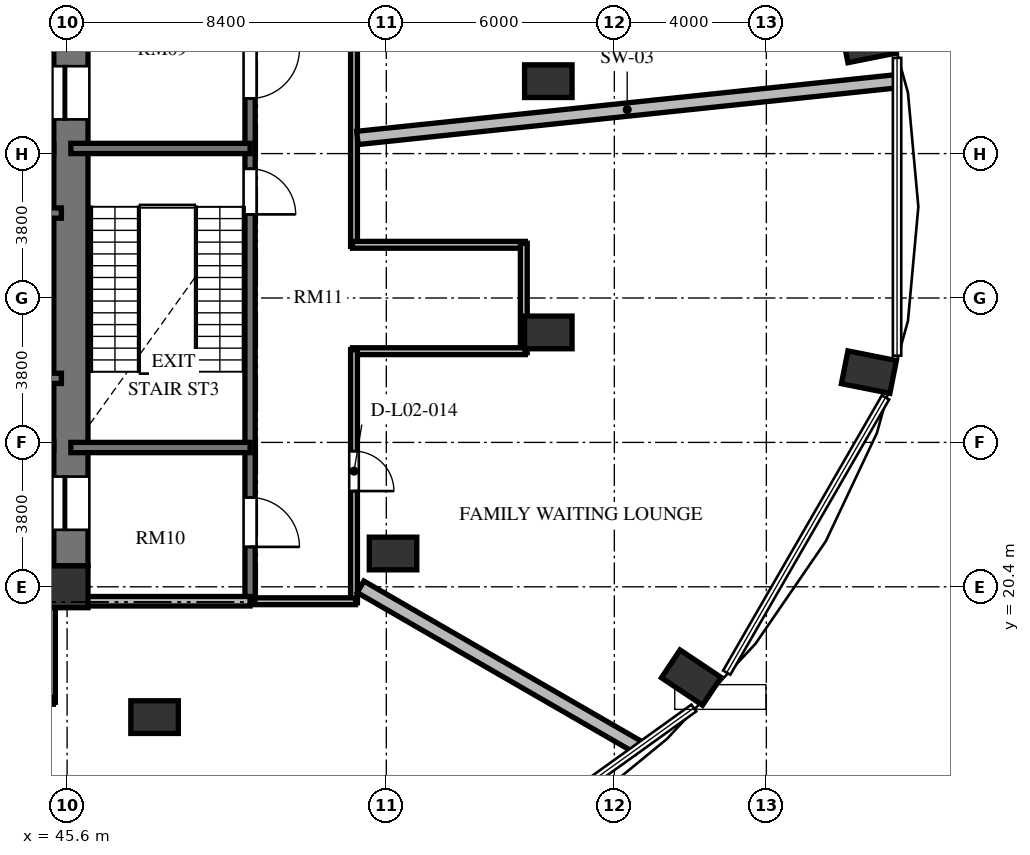
"""IFC4 building model, lengths in metres.
Left out: names, types, materials, properties, quantities, classifications, styles, units other than length and angle.
Written with IfcOpenShell. Run it as: python <this file> out.ifc"""

import sys

from ifc_helpers import new_model, si_unit, direction, frame, frame_2d, origin, origin_2d, place, context, subcontext, project, spatial, rectangle, extrude, element, fill, save


model = new_model("IFC4")
c1 = context("Model", 3, precision=1e-05, world=origin(), true_north=direction((0.0, 1.0)))
c2 = subcontext(c1, "Body", "Model", "MODEL_VIEW")
j1 = project(units=[si_unit("LENGTHUNIT", "METRE"), si_unit("PLANEANGLEUNIT", "RADIAN")], contexts=[c1])
p1 = place(None, origin())
s1 = spatial("IfcSite", under=j1, at=p1, CompositionType="ELEMENT")
p2 = place(p1, origin())
s2 = spatial("IfcBuilding", under=s1, at=p2, CompositionType="ELEMENT")
p3 = place(p2, frame((0.0, 0.0, 10.8)))
s3 = spatial("IfcBuildingStorey", under=s2, at=p3, CompositionType="ELEMENT", Elevation=10.8)
for number, where, z_axis, x_axis in (
    (1, (62.025, 18.011, 0.0), (0.0, 0.0, 1.0), (0.831, -0.556, 0.0)),
    (2, (66.698, 26.05, 0.0), (0.0, 0.0, 1.0), (0.981, -0.195, 0.0)),
    (3, (66.698, 34.75, 0.0), (0.0, 0.0, 1.0), (0.981, 0.195, 0.0)),
):
    element("IfcColumn", number, at=place(p3, frame(where, z_axis=z_axis, x_axis=x_axis)), inside=s3, PredefinedType="COLUMN", context=c2, shape_type="SweptSolid", body=[
        extrude(rectangle(XDim=1.3, YDim=0.88, at=origin_2d()), origin(), (0.0, 0.0, 1.0), 4.8),
    ])
p4 = place(p3, frame((45.6, 20.4, 0.0), z_axis=(0.0, 0.0, 1.0), x_axis=(1.0, 0.0, 0.0)))
e4 = element("IfcColumn", 4, at=p4, inside=s3, PredefinedType="COLUMN", context=c2, shape_type="SweptSolid", body=[
    extrude(rectangle(XDim=1.1, YDim=1.1, at=origin_2d()), origin(), (0.0, 0.0, 1.0), 4.8),
])
for number, where, z_axis, x_axis in (
    (5, (47.902, 16.971, 0.0), (0.0, 0.0, 1.0), (1.0, 0.0, 0.0)),
    (6, (54.177, 21.276, 0.0), (0.0, 0.0, 1.0), (1.0, 0.0, 0.0)),
    (7, (58.263, 27.094, 0.0), (0.0, 0.0, 1.0), (1.0, 0.0, 0.0)),
    (8, (58.263, 33.706, 0.0), (0.0, 0.0, 1.0), (1.0, 0.0, 0.0)),
):
    element("IfcColumn", number, at=place(p3, frame(where, z_axis=z_axis, x_axis=x_axis)), inside=s3, PredefinedType="COLUMN", context=c2, shape_type="SweptSolid", body=[
        extrude(rectangle(XDim=1.25, YDim=0.86, at=origin_2d()), origin(), (0.0, 0.0, 1.0), 4.8),
    ])
p5 = place(p3, frame((45.7, 20.95, 0.0), z_axis=(0.0, 0.0, 1.0), x_axis=(0.0, 1.0, 0.0)))
e9 = element("IfcWall", 9, at=p5, inside=s3, PredefinedType="SHEAR", context=c2, shape_type="SweptSolid", body=[
    extrude(rectangle(XDim=14.1, YDim=0.9, at=frame_2d((7.05, 0.0))), origin(), (0.0, 0.0, 1.0), 4.8),
])
p6 = place(p5, frame((11.75, 0.0, 0.0)))
e10 = element("IfcOpeningElement", 10, at=p6, cuts=e9, PredefinedType="OPENING", context=c2, shape_type="SweptSolid", body=[
    extrude(rectangle(XDim=1.4, YDim=2.3, at=frame_2d((0.7, 1.15))), frame((0.0, 0.46, 0.0), z_axis=(0.0, -1.0, 0.0), x_axis=(1.0, 0.0, 0.0)), (0.0, 0.0, 1.0), 0.92),
])
p7 = place(p5, frame((0.95, 0.0, 0.0)))
e11 = element("IfcOpeningElement", 11, at=p7, cuts=e9, PredefinedType="OPENING", context=c2, shape_type="SweptSolid", body=[
    extrude(rectangle(XDim=1.4, YDim=2.3, at=frame_2d((0.7, 1.15))), frame((0.0, 0.46, 0.0), z_axis=(0.0, -1.0, 0.0), x_axis=(1.0, 0.0, 0.0)), (0.0, 0.0, 1.0), 0.92),
])
p8 = place(p3, frame((37.465, 30.235, 0.0), z_axis=(0.0, 0.0, 1.0), x_axis=(1.0, 0.0, 0.0)))
e12 = element("IfcWall", 12, at=p8, inside=s3, PredefinedType="SHEAR", context=c2, shape_type="SweptSolid", body=[
    extrude(rectangle(XDim=7.985, YDim=0.27, at=frame_2d((3.992, 0.0))), origin(), (0.0, 0.0, 1.0), 4.8),
])
p9 = place(p8, frame((6.455, 0.0, 0.0)))
e13 = element("IfcOpeningElement", 13, at=p9, cuts=e12, PredefinedType="OPENING", context=c2, shape_type="SweptSolid", body=[
    extrude(rectangle(XDim=1.2, YDim=2.15, at=frame_2d((0.6, 1.075))), frame((0.0, 0.145, 0.0), z_axis=(0.0, -1.0, 0.0), x_axis=(1.0, 0.0, 0.0)), (0.0, 0.0, 1.0), 0.29),
])
p10 = place(p3, frame((37.465, 25.885, 0.0), z_axis=(0.0, 0.0, 1.0), x_axis=(1.0, 0.0, 0.0)))
e14 = element("IfcWall", 14, at=p10, inside=s3, PredefinedType="SHEAR", context=c2, shape_type="SweptSolid", body=[
    extrude(rectangle(XDim=7.985, YDim=0.27, at=frame_2d((3.992, 0.0))), origin(), (0.0, 0.0, 1.0), 4.8),
])
for number, where, z_axis, x_axis in (
    (15, (42.95, 31.92, 0.0), (0.0, 0.0, 1.0), (1.0, 0.0, 0.0)),
    (16, (42.95, 24.1, 0.0), (0.0, 0.0, 1.0), (1.0, 0.0, 0.0)),
):
    element("IfcWall", number, at=place(p3, frame(where, z_axis=z_axis, x_axis=x_axis)), inside=s3, PredefinedType="SOLIDWALL", context=c2, shape_type="SweptSolid", body=[
        extrude(rectangle(XDim=2.3, YDim=0.25, at=frame_2d((1.15, 0.0))), origin(), (0.0, 0.0, 1.0), 4.52),
    ])
p11 = place(p3, frame((50.415, 35.845, 0.0), z_axis=(0.0, 0.0, 1.0), x_axis=(0.0, -1.0, 0.0)))
e17 = element("IfcWall", 17, at=p11, inside=s3, PredefinedType="SHEAR", context=c2, shape_type="SweptSolid", body=[
    extrude(rectangle(XDim=15.825, YDim=0.27, at=frame_2d((7.913, 0.0))), origin(), (0.0, 0.0, 1.0), 4.8),
])
p12 = place(p11, frame((4.445, 0.0, 0.0)))
e18 = element("IfcOpeningElement", 18, at=p12, cuts=e17, PredefinedType="OPENING", context=c2, shape_type="SweptSolid", body=[
    extrude(rectangle(XDim=1.2, YDim=2.15, at=frame_2d((0.6, 1.075))), frame((0.0, 0.145, 0.0), z_axis=(0.0, -1.0, 0.0), x_axis=(1.0, 0.0, 0.0)), (0.0, 0.0, 1.0), 0.29),
])
p13 = place(p11, frame((1.295, 0.0, 0.0)))
e19 = element("IfcOpeningElement", 19, at=p13, cuts=e17, PredefinedType="OPENING", context=c2, shape_type="SweptSolid", body=[
    extrude(rectangle(XDim=1.3, YDim=2.2, at=frame_2d((0.65, 1.1))), frame((0.0, 0.145, 0.0), z_axis=(0.0, -1.0, 0.0), x_axis=(1.0, 0.0, 0.0)), (0.0, 0.0, 1.0), 0.29),
])
p14 = place(p11, frame((13.095, 0.0, 0.0)))
e20 = element("IfcOpeningElement", 20, at=p14, cuts=e17, PredefinedType="OPENING", context=c2, shape_type="SweptSolid", body=[
    extrude(rectangle(XDim=1.3, YDim=2.2, at=frame_2d((0.65, 1.1))), frame((0.0, 0.145, 0.0), z_axis=(0.0, -1.0, 0.0), x_axis=(1.0, 0.0, 0.0)), (0.0, 0.0, 1.0), 0.29),
])
for number, where, z_axis, x_axis in (
    (21, (45.7, 31.935, 0.0), (0.0, 0.0, 1.0), (1.0, 0.0, 0.0)),
    (22, (45.7, 24.065, 0.0), (0.0, 0.0, 1.0), (1.0, 0.0, 0.0)),
):
    element("IfcWall", number, at=place(p3, frame(where, z_axis=z_axis, x_axis=x_axis)), inside=s3, PredefinedType="SHEAR", context=c2, shape_type="SweptSolid", body=[
        extrude(rectangle(XDim=4.715, YDim=0.27, at=frame_2d((2.357, 0.0))), origin(), (0.0, 0.0, 1.0), 4.8),
    ])
p15 = place(p3, frame((45.7, 20.02, 0.0), z_axis=(0.0, 0.0, 1.0), x_axis=(1.0, 0.0, 0.0)))
e23 = element("IfcWall", 23, at=p15, inside=s3, PredefinedType="SOLIDWALL", context=c2, shape_type="SweptSolid", body=[
    extrude(rectangle(XDim=4.715, YDim=0.25, at=frame_2d((2.357, 0.0))), origin(), (0.0, 0.0, 1.0), 4.52),
])
p16 = place(p3, frame((53.15, 38.79, 0.0), z_axis=(0.0, 0.0, 1.0), x_axis=(0.0, -1.0, 0.0)))
e24 = element("IfcWall", 24, at=p16, inside=s3, PredefinedType="PARTITIONING", context=c2, shape_type="SweptSolid", body=[
    extrude(rectangle(XDim=9.43, YDim=0.18, at=frame_2d((4.715, 0.0))), origin(), (0.0, 0.0, 1.0), 4.205),
])
p17 = place(p3, frame((53.11, 29.4, 0.0), z_axis=(0.0, 0.0, 1.0), x_axis=(1.0, 0.0, 0.0)))
e25 = element("IfcWall", 25, at=p17, inside=s3, PredefinedType="PARTITIONING", context=c2, shape_type="SweptSolid", body=[
    extrude(rectangle(XDim=4.548, YDim=0.18, at=frame_2d((2.274, 0.0))), origin(), (0.0, 0.0, 1.0), 4.52),
])
p18 = place(p3, frame((57.618, 29.44, 0.0), z_axis=(0.0, 0.0, 1.0), x_axis=(0.0, -1.0, 0.0)))
e26 = element("IfcWall", 26, at=p18, inside=s3, PredefinedType="PARTITIONING", context=c2, shape_type="SweptSolid", body=[
    extrude(rectangle(XDim=2.88, YDim=0.18, at=frame_2d((1.44, 0.0))), origin(), (0.0, 0.0, 1.0), 4.52),
])
p19 = place(p3, frame((57.658, 26.6, 0.0), z_axis=(0.0, 0.0, 1.0), x_axis=(-1.0, 0.0, 0.0)))
e27 = element("IfcWall", 27, at=p19, inside=s3, PredefinedType="PARTITIONING", context=c2, shape_type="SweptSolid", body=[
    extrude(rectangle(XDim=4.548, YDim=0.18, at=frame_2d((2.274, 0.0))), origin(), (0.0, 0.0, 1.0), 4.52),
])
p20 = place(p3, frame((53.15, 26.64, 0.0), z_axis=(0.0, 0.0, 1.0), x_axis=(0.0, -1.0, 0.0)))
e28 = element("IfcWall", 28, at=p20, inside=s3, PredefinedType="PARTITIONING", context=c2, shape_type="SweptSolid", body=[
    extrude(rectangle(XDim=6.66, YDim=0.18, at=frame_2d((3.33, 0.0))), origin(), (0.0, 0.0, 1.0), 4.52),
])
p21 = place(p20, frame((2.671, 0.0, 0.0)))
e29 = element("IfcOpeningElement", 29, at=p21, cuts=e28, PredefinedType="OPENING", context=c2, shape_type="SweptSolid", body=[
    extrude(rectangle(XDim=1.05, YDim=2.15, at=frame_2d((0.525, 1.075))), frame((0.0, 0.1, 0.0), z_axis=(0.0, -1.0, 0.0), x_axis=(1.0, 0.0, 0.0)), (0.0, 0.0, 1.0), 0.2),
])
p22 = place(p3, frame((53.19, 20.02, 0.0), z_axis=(0.0, 0.0, 1.0), x_axis=(-1.0, 0.0, 0.0)))
e30 = element("IfcWall", 30, at=p22, inside=s3, PredefinedType="PARTITIONING", context=c2, shape_type="SweptSolid", body=[
    extrude(rectangle(XDim=2.65, YDim=0.18, at=frame_2d((1.325, 0.0))), origin(), (0.0, 0.0, 1.0), 4.52),
])
p23 = place(p3, frame((45.2, 19.91, 0.0), z_axis=(0.0, 0.0, 1.0), x_axis=(0.0, -1.0, 0.0)))
e31 = element("IfcWall", 31, at=p23, inside=s3, PredefinedType="PARTITIONING", context=c2, shape_type="SweptSolid", body=[
    extrude(rectangle(XDim=2.55, YDim=0.18, at=frame_2d((1.275, 0.0))), origin(), (0.0, 0.0, 1.0), 4.52),
])
p24 = place(p3, frame((45.24, 17.4, 0.0), z_axis=(0.0, 0.0, 1.0), x_axis=(-1.0, 0.0, 0.0)))
e32 = element("IfcWall", 32, at=p24, inside=s3, PredefinedType="PARTITIONING", context=c2, shape_type="SweptSolid", body=[
    extrude(rectangle(XDim=21.93, YDim=0.18, at=frame_2d((10.965, 0.0))), origin(), (0.0, 0.0, 1.0), 4.52),
])
p25 = place(p24, frame((14.496, 0.0, 0.0)))
e33 = element("IfcOpeningElement", 33, at=p25, cuts=e32, PredefinedType="OPENING", context=c2, shape_type="SweptSolid", body=[
    extrude(rectangle(XDim=0.95, YDim=2.1, at=frame_2d((0.475, 1.05))), frame((0.0, 0.1, 0.0), z_axis=(0.0, -1.0, 0.0), x_axis=(1.0, 0.0, 0.0)), (0.0, 0.0, 1.0), 0.2),
])
p26 = place(p24, frame((8.49, 0.0, 0.0)))
e34 = element("IfcOpeningElement", 34, at=p26, cuts=e32, PredefinedType="OPENING", context=c2, shape_type="SweptSolid", body=[
    extrude(rectangle(XDim=0.95, YDim=2.1, at=frame_2d((0.475, 1.05))), frame((0.0, 0.1, 0.0), z_axis=(0.0, -1.0, 0.0), x_axis=(1.0, 0.0, 0.0)), (0.0, 0.0, 1.0), 0.2),
])
p27 = place(p24, frame((3.597, 0.0, 0.0)))
e35 = element("IfcOpeningElement", 35, at=p27, cuts=e32, PredefinedType="OPENING", context=c2, shape_type="SweptSolid", body=[
    extrude(rectangle(XDim=0.95, YDim=2.1, at=frame_2d((0.475, 1.05))), frame((0.0, 0.1, 0.0), z_axis=(0.0, -1.0, 0.0), x_axis=(1.0, 0.0, 0.0)), (0.0, 0.0, 1.0), 0.2),
])
p28 = place(p24, frame((1.141, 0.0, 0.0)))
e36 = element("IfcOpeningElement", 36, at=p28, cuts=e32, PredefinedType="OPENING", context=c2, shape_type="SweptSolid", body=[
    extrude(rectangle(XDim=1.4, YDim=2.2, at=frame_2d((0.7, 1.1))), frame((0.0, 0.1, 0.0), z_axis=(0.0, -1.0, 0.0), x_axis=(1.0, 0.0, 0.0)), (0.0, 0.0, 1.0), 0.2),
])
p29 = place(p3, frame((41.847, 17.267, 0.0), z_axis=(0.0, 0.0, 1.0), x_axis=(0.406746917765, -0.913540882987, 0.0)))
e37 = element("IfcWall", 37, at=p29, inside=s3, PredefinedType="PARTITIONING", context=c2, shape_type="SweptSolid", body=[
    extrude(rectangle(XDim=9.231, YDim=0.22, at=frame_2d((4.616, 0.0))), origin(), (0.0, 0.0, 1.0), 4.52),
])
p30 = place(p3, frame((53.322, 20.399, 0.0), z_axis=(0.0, 0.0, 1.0), x_axis=(0.866024398109, -0.500001741877, 0.0)))
e38 = element("IfcWall", 38, at=p30, inside=s3, PredefinedType="SOLIDWALL", context=c2, shape_type="SweptSolid", body=[
    extrude(rectangle(XDim=8.45, YDim=0.35, at=frame_2d((4.225, 0.0))), origin(), (0.0, 0.0, 1.0), 4.52),
])
p31 = place(p3, frame((53.24, 32.212, 0.0), z_axis=(0.0, 0.0, 1.0), x_axis=(0.994522307274, 0.104524544177, 0.0)))
e39 = element("IfcWall", 39, at=p31, inside=s3, PredefinedType="SOLIDWALL", context=c2, shape_type="SweptSolid", body=[
    extrude(rectangle(XDim=14.276, YDim=0.35, at=frame_2d((7.138, 0.0))), origin(), (0.0, 0.0, 1.0), 4.52),
])
p32 = place(p6, origin())
e40 = element("IfcDoor", 40, at=p32, inside=s3, OperationType="SLIDING_TO_LEFT", PredefinedType="DOOR", context=c2, shape_type="SweptSolid", body=[
    extrude(rectangle(XDim=1.4, YDim=2.3, at=frame_2d((0.7, 1.15))), frame((0.0, 0.025, 0.0), z_axis=(0.0, -1.0, 0.0), x_axis=(1.0, 0.0, 0.0)), (0.0, 0.0, 1.0), 0.05),
])
fill(e10, e40)
p33 = place(p7, origin())
e41 = element("IfcDoor", 41, at=p33, inside=s3, OperationType="SLIDING_TO_LEFT", PredefinedType="DOOR", context=c2, shape_type="SweptSolid", body=[
    extrude(rectangle(XDim=1.4, YDim=2.3, at=frame_2d((0.7, 1.15))), frame((0.0, 0.025, 0.0), z_axis=(0.0, -1.0, 0.0), x_axis=(1.0, 0.0, 0.0)), (0.0, 0.0, 1.0), 0.05),
])
fill(e11, e41)
p34 = place(p12, origin())
e42 = element("IfcDoor", 42, at=p34, inside=s3, OperationType="SINGLE_SWING_RIGHT", PredefinedType="DOOR", context=c2, shape_type="SweptSolid", body=[
    extrude(rectangle(XDim=1.2, YDim=2.15, at=frame_2d((0.6, 1.075))), frame((0.0, 0.025, 0.0), z_axis=(0.0, -1.0, 0.0), x_axis=(1.0, 0.0, 0.0)), (0.0, 0.0, 1.0), 0.05),
])
fill(e18, e42)
p35 = place(p13, origin())
e43 = element("IfcDoor", 43, at=p35, inside=s3, OperationType="SINGLE_SWING_LEFT", PredefinedType="DOOR", context=c2, shape_type="SweptSolid", body=[
    extrude(rectangle(XDim=1.3, YDim=2.2, at=frame_2d((0.65, 1.1))), frame((0.0, 0.025, 0.0), z_axis=(0.0, -1.0, 0.0), x_axis=(1.0, 0.0, 0.0)), (0.0, 0.0, 1.0), 0.05),
])
fill(e19, e43)
p36 = place(p14, origin())
e44 = element("IfcDoor", 44, at=p36, inside=s3, OperationType="SINGLE_SWING_RIGHT", PredefinedType="DOOR", context=c2, shape_type="SweptSolid", body=[
    extrude(rectangle(XDim=1.3, YDim=2.2, at=frame_2d((0.65, 1.1))), frame((0.0, 0.025, 0.0), z_axis=(0.0, -1.0, 0.0), x_axis=(1.0, 0.0, 0.0)), (0.0, 0.0, 1.0), 0.05),
])
fill(e20, e44)
p37 = place(p21, origin())
e45 = element("IfcDoor", 45, at=p37, inside=s3, OperationType="SINGLE_SWING_RIGHT", PredefinedType="DOOR", context=c2, shape_type="SweptSolid", body=[
    extrude(rectangle(XDim=1.05, YDim=2.15, at=frame_2d((0.525, 1.075))), frame((0.0, 0.025, 0.0), z_axis=(0.0, -1.0, 0.0), x_axis=(1.0, 0.0, 0.0)), (0.0, 0.0, 1.0), 0.05),
])
fill(e29, e45)
save(model, sys.argv[1])
